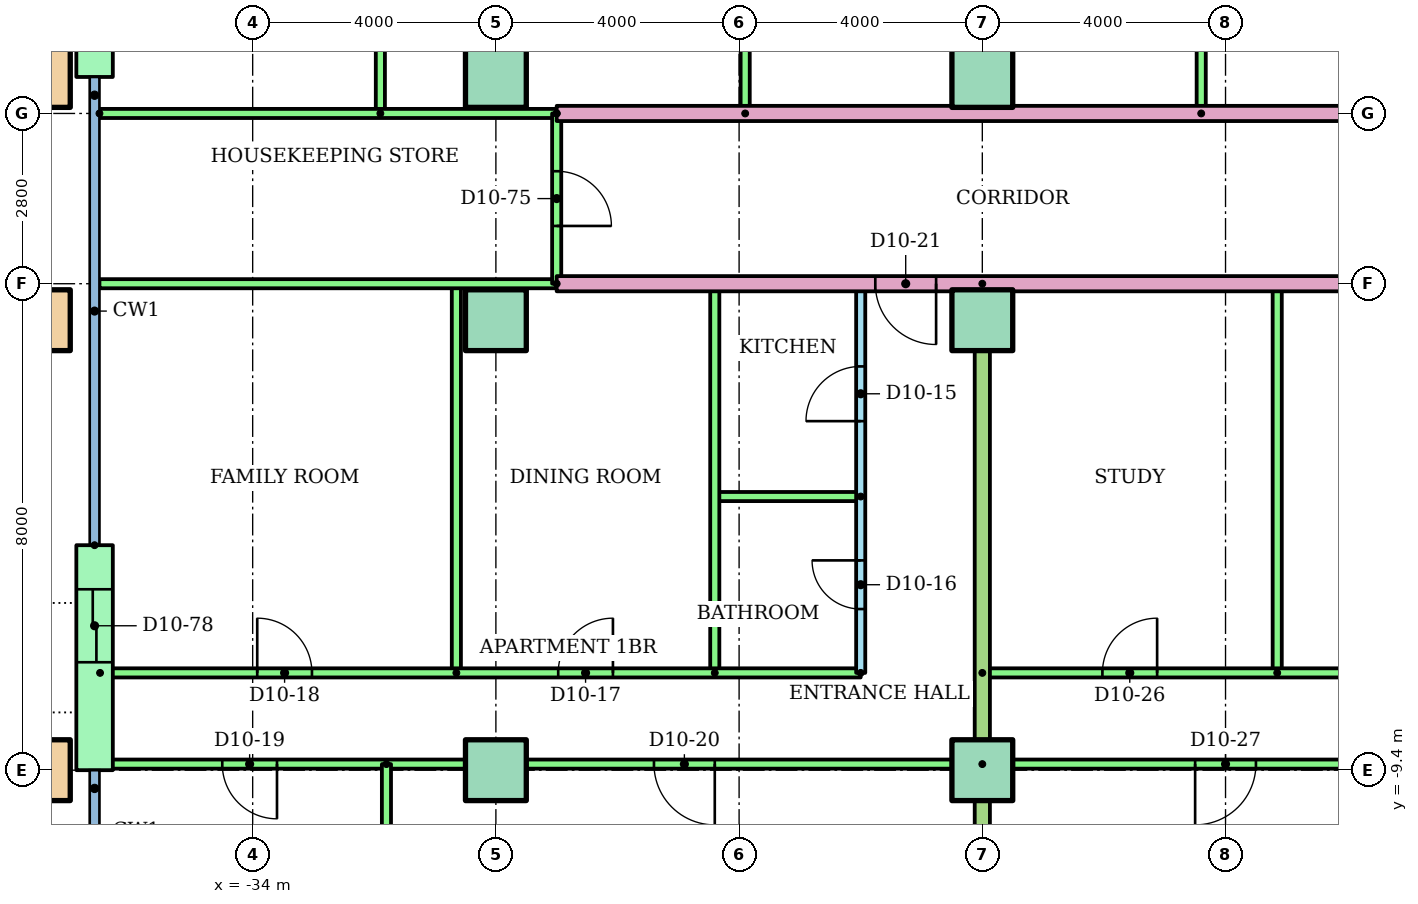
"""IFC4 building model, lengths in metres.
Left out: names, types, materials, properties, quantities, classifications, styles, units other than length and angle.
Written with IfcOpenShell. Run it as: python <this file> out.ifc"""

import sys

from ifc_helpers import new_model, si_unit, direction, frame, frame_2d, origin, origin_2d, place, context, subcontext, project, spatial, rectangle, hollow_rectangle, extrude, element, fill, save


model = new_model("IFC4")
c1 = context("Model", 3, precision=1e-05, world=origin(), true_north=direction((0.0, 1.0)))
c2 = subcontext(c1, "Body", "Model", "MODEL_VIEW")
j1 = project(units=[si_unit("LENGTHUNIT", "METRE"), si_unit("PLANEANGLEUNIT", "RADIAN")], contexts=[c1])
p1 = place(None, origin())
s1 = spatial("IfcSite", under=j1, at=p1, CompositionType="ELEMENT")
p2 = place(p1, origin())
s2 = spatial("IfcBuilding", under=s1, at=p2, CompositionType="ELEMENT")
p3 = place(p2, frame((0.0, 0.0, 41.6)))
s3 = spatial("IfcBuildingStorey", under=s2, at=p3, CompositionType="ELEMENT", Elevation=41.6)
p4 = place(p3, frame((-37.5, -9.4, 0.0)))
e1 = element("IfcColumn", 1, at=p4, inside=s3, PredefinedType="COLUMN", context=c2, shape_type="SweptSolid", body=[
    extrude(hollow_rectangle(XDim=1.0, YDim=1.0, WallThickness=0.05, at=origin_2d()), origin(), (0.0, 0.0, 1.0), 3.2),
])
for number, where in (
    (2, (-30.0, -9.4, 0.0)),
    (3, (-22.0, -9.4, 0.0)),
):
    element("IfcColumn", number, at=place(p3, frame(where)), inside=s3, PredefinedType="COLUMN", context=c2, shape_type="SweptSolid", body=[
        extrude(rectangle(XDim=1.0, YDim=1.0, at=origin_2d()), origin(), (0.0, 0.0, 1.0), 3.2),
    ])
p5 = place(p3, frame((-37.5, -2.0, 0.0)))
e4 = element("IfcColumn", 4, at=p5, inside=s3, PredefinedType="COLUMN", context=c2, shape_type="SweptSolid", body=[
    extrude(hollow_rectangle(XDim=1.0, YDim=1.0, WallThickness=0.05, at=origin_2d()), origin(), (0.0, 0.0, 1.0), 3.2),
])
for number, where in (
    (5, (-30.0, -2.0, 0.0)),
    (6, (-22.0, -2.0, 0.0)),
):
    element("IfcColumn", number, at=place(p3, frame(where)), inside=s3, PredefinedType="COLUMN", context=c2, shape_type="SweptSolid", body=[
        extrude(rectangle(XDim=1.0, YDim=1.0, at=origin_2d()), origin(), (0.0, 0.0, 1.0), 3.2),
    ])
p6 = place(p3, frame((-37.5, 2.0, 0.0)))
e7 = element("IfcColumn", 7, at=p6, inside=s3, PredefinedType="COLUMN", context=c2, shape_type="SweptSolid", body=[
    extrude(hollow_rectangle(XDim=1.0, YDim=1.0, WallThickness=0.05, at=origin_2d()), origin(), (0.0, 0.0, 1.0), 3.2),
])
for number, where in (
    (8, (-30.0, 2.0, 0.0)),
    (9, (-22.0, 2.0, 0.0)),
):
    element("IfcColumn", number, at=place(p3, frame(where)), inside=s3, PredefinedType="COLUMN", context=c2, shape_type="SweptSolid", body=[
        extrude(rectangle(XDim=1.0, YDim=1.0, at=origin_2d()), origin(), (0.0, 0.0, 1.0), 3.2),
    ])
p7 = place(p3, frame((-36.6, 6.5, 0.0), z_axis=(0.0, 0.0, 1.0), x_axis=(0.0, -1.0, 0.0)))
e10 = element("IfcWall", 10, at=p7, inside=s3, PredefinedType="STANDARD", context=c2, shape_type="SweptSolid", body=[
    extrude(rectangle(XDim=4.5, YDim=0.6, at=frame_2d((2.25, 0.0))), origin(), (0.0, 0.0, 1.0), 2.92),
])
p8 = place(p7, frame((1.65, 0.0, 0.0)))
e11 = element("IfcOpeningElement", 11, at=p8, cuts=e10, PredefinedType="OPENING", context=c2, shape_type="SweptSolid", body=[
    extrude(rectangle(XDim=1.2, YDim=2.1, at=frame_2d((0.6, 1.05))), frame((0.0, 0.31, 0.0), z_axis=(0.0, -1.0, 0.0), x_axis=(1.0, 0.0, 0.0)), (0.0, 0.0, 1.0), 0.62),
])
p9 = place(p3, frame((-36.6, -5.7, 0.0), z_axis=(0.0, 0.0, 1.0), x_axis=(0.0, -1.0, 0.0)))
e12 = element("IfcWall", 12, at=p9, inside=s3, PredefinedType="STANDARD", context=c2, shape_type="SweptSolid", body=[
    extrude(rectangle(XDim=3.7, YDim=0.6, at=frame_2d((1.85, 0.0))), origin(), (0.0, 0.0, 1.0), 2.92),
])
p10 = place(p9, frame((0.725, 0.0, 0.0)))
e13 = element("IfcOpeningElement", 13, at=p10, cuts=e12, PredefinedType="OPENING", context=c2, shape_type="SweptSolid", body=[
    extrude(rectangle(XDim=1.2, YDim=2.1, at=frame_2d((0.6, 1.05))), frame((0.0, 0.31, 0.0), z_axis=(0.0, -1.0, 0.0), x_axis=(1.0, 0.0, 0.0)), (0.0, 0.0, 1.0), 0.62),
])
p11 = place(p3, frame((-24.0, -7.8, 0.0), z_axis=(0.0, 0.0, 1.0), x_axis=(0.0, 1.0, 0.0)))
e14 = element("IfcWall", 14, at=p11, inside=s3, PredefinedType="PARTITIONING", context=c2, shape_type="SweptSolid", body=[
    extrude(rectangle(XDim=6.4, YDim=0.15, at=frame_2d((3.2, 0.0))), origin(), (0.0, 0.0, 1.0), 2.4),
])
p12 = place(p11, frame((4.14, 0.0, 0.0)))
e15 = element("IfcOpeningElement", 15, at=p12, cuts=e14, PredefinedType="OPENING", context=c2, shape_type="SweptSolid", body=[
    extrude(rectangle(XDim=0.9, YDim=2.1, at=frame_2d((0.45, 1.05))), frame((0.0, 0.085, 0.0), z_axis=(0.0, -1.0, 0.0), x_axis=(1.0, 0.0, 0.0)), (0.0, 0.0, 1.0), 0.17),
])
p13 = place(p11, frame((1.05, 0.0, 0.0)))
e16 = element("IfcOpeningElement", 16, at=p13, cuts=e14, PredefinedType="OPENING", context=c2, shape_type="SweptSolid", body=[
    extrude(rectangle(XDim=0.8, YDim=2.1, at=frame_2d((0.4, 1.05))), frame((0.0, 0.085, 0.0), z_axis=(0.0, -1.0, 0.0), x_axis=(1.0, 0.0, 0.0)), (0.0, 0.0, 1.0), 0.17),
])
p14 = place(p3, frame((-24.0, -4.9, 0.0), z_axis=(0.0, 0.0, 1.0), x_axis=(-1.0, 0.0, 0.0)))
e17 = element("IfcWall", 17, at=p14, inside=s3, PredefinedType="PARTITIONING", context=c2, shape_type="SweptSolid", body=[
    extrude(rectangle(XDim=2.4, YDim=0.15, at=frame_2d((1.2, 0.0))), origin(), (0.0, 0.0, 1.0), 2.4),
])
for number, where, z_axis, x_axis in (
    (18, (-26.4, -7.8, 0.0), (0.0, 0.0, 1.0), (0.0, 1.0, 0.0)),
    (19, (-30.65, -7.8, 0.0), (0.0, 0.0, 1.0), (0.0, 1.0, 0.0)),
):
    element("IfcWall", number, at=place(p3, frame(where, z_axis=z_axis, x_axis=x_axis)), inside=s3, PredefinedType="PARTITIONING", context=c2, shape_type="SweptSolid", body=[
        extrude(rectangle(XDim=6.4, YDim=0.15, at=frame_2d((3.2, 0.0))), origin(), (0.0, 0.0, 1.0), 2.4),
    ])
p15 = place(p3, frame((-36.51, -7.8, 0.0)))
e20 = element("IfcWall", 20, at=p15, inside=s3, PredefinedType="PARTITIONING", context=c2, shape_type="SweptSolid", body=[
    extrude(rectangle(XDim=12.51, YDim=0.15, at=frame_2d((6.255, 0.0))), origin(), (0.0, 0.0, 1.0), 2.4),
])
p16 = place(p15, frame((7.535, 0.0, 0.0)))
e21 = element("IfcOpeningElement", 21, at=p16, cuts=e20, PredefinedType="OPENING", context=c2, shape_type="SweptSolid", body=[
    extrude(rectangle(XDim=0.9, YDim=2.1, at=frame_2d((0.45, 1.05))), frame((0.0, 0.085, 0.0), z_axis=(0.0, -1.0, 0.0), x_axis=(1.0, 0.0, 0.0)), (0.0, 0.0, 1.0), 0.17),
])
p17 = place(p15, frame((2.585, 0.0, 0.0)))
e22 = element("IfcOpeningElement", 22, at=p17, cuts=e20, PredefinedType="OPENING", context=c2, shape_type="SweptSolid", body=[
    extrude(rectangle(XDim=0.9, YDim=2.1, at=frame_2d((0.45, 1.05))), frame((0.0, 0.085, 0.0), z_axis=(0.0, -1.0, 0.0), x_axis=(1.0, 0.0, 0.0)), (0.0, 0.0, 1.0), 0.17),
])
p18 = place(p3, frame((-22.0, -9.3, 0.0), z_axis=(0.0, 0.0, 1.0), x_axis=(-1.0, 0.0, 0.0)))
e23 = element("IfcWall", 23, at=p18, inside=s3, PredefinedType="PARTITIONING", context=c2, shape_type="SweptSolid", body=[
    extrude(rectangle(XDim=14.51, YDim=0.15, at=frame_2d((7.255, 0.0))), origin(), (0.0, 0.0, 1.0), 2.4),
])
p19 = place(p18, frame((11.6, 0.0, 0.0)))
e24 = element("IfcOpeningElement", 24, at=p19, cuts=e23, PredefinedType="OPENING", context=c2, shape_type="SweptSolid", body=[
    extrude(rectangle(XDim=0.9, YDim=2.1, at=frame_2d((0.45, 1.05))), frame((0.0, 0.085, 0.0), z_axis=(0.0, -1.0, 0.0), x_axis=(1.0, 0.0, 0.0)), (0.0, 0.0, 1.0), 0.17),
])
p20 = place(p18, frame((4.4, 0.0, 0.0)))
e25 = element("IfcOpeningElement", 25, at=p20, cuts=e23, PredefinedType="OPENING", context=c2, shape_type="SweptSolid", body=[
    extrude(rectangle(XDim=1.0, YDim=2.1, at=frame_2d((0.5, 1.05))), frame((0.0, 0.085, 0.0), z_axis=(0.0, -1.0, 0.0), x_axis=(1.0, 0.0, 0.0)), (0.0, 0.0, 1.0), 0.17),
])
p21 = place(p3, frame((-31.8, -9.3, 0.0), z_axis=(0.0, 0.0, 1.0), x_axis=(0.0, -1.0, 0.0)))
e26 = element("IfcWall", 26, at=p21, inside=s3, PredefinedType="PARTITIONING", context=c2, shape_type="SweptSolid", body=[
    extrude(rectangle(XDim=5.02, YDim=0.15, at=frame_2d((2.51, 0.0))), origin(), (0.0, 0.0, 1.0), 2.4),
])
p22 = place(p3, frame((-17.15, -7.8, 0.0), z_axis=(0.0, 0.0, 1.0), x_axis=(0.0, 1.0, 0.0)))
e27 = element("IfcWall", 27, at=p22, inside=s3, PredefinedType="PARTITIONING", context=c2, shape_type="SweptSolid", body=[
    extrude(rectangle(XDim=6.4, YDim=0.15, at=frame_2d((3.2, 0.0))), origin(), (0.0, 0.0, 1.0), 2.4),
])
p23 = place(p3, frame((-22.0, -7.8, 0.0)))
e28 = element("IfcWall", 28, at=p23, inside=s3, PredefinedType="PARTITIONING", context=c2, shape_type="SweptSolid", body=[
    extrude(rectangle(XDim=22.0, YDim=0.15, at=frame_2d((11.0, 0.0))), origin(), (0.0, 0.0, 1.0), 2.4),
])
p24 = place(p23, frame((14.34, 0.0, 0.0)))
e29 = element("IfcOpeningElement", 29, at=p24, cuts=e28, PredefinedType="OPENING", context=c2, shape_type="SweptSolid", body=[
    extrude(rectangle(XDim=0.9, YDim=2.1, at=frame_2d((0.45, 1.05))), frame((0.0, 0.085, 0.0), z_axis=(0.0, -1.0, 0.0), x_axis=(1.0, 0.0, 0.0)), (0.0, 0.0, 1.0), 0.17),
])
p25 = place(p23, frame((8.76, 0.0, 0.0)))
e30 = element("IfcOpeningElement", 30, at=p25, cuts=e28, PredefinedType="OPENING", context=c2, shape_type="SweptSolid", body=[
    extrude(rectangle(XDim=0.9, YDim=2.1, at=frame_2d((0.45, 1.05))), frame((0.0, 0.085, 0.0), z_axis=(0.0, -1.0, 0.0), x_axis=(1.0, 0.0, 0.0)), (0.0, 0.0, 1.0), 0.17),
])
p26 = place(p23, frame((1.975, 0.0, 0.0)))
e31 = element("IfcOpeningElement", 31, at=p26, cuts=e28, PredefinedType="OPENING", context=c2, shape_type="SweptSolid", body=[
    extrude(rectangle(XDim=0.9, YDim=2.1, at=frame_2d((0.45, 1.05))), frame((0.0, 0.085, 0.0), z_axis=(0.0, -1.0, 0.0), x_axis=(1.0, 0.0, 0.0)), (0.0, 0.0, 1.0), 0.17),
])
p27 = place(p3, frame((2.0, -9.3, 0.0), z_axis=(0.0, 0.0, 1.0), x_axis=(-1.0, 0.0, 0.0)))
e32 = element("IfcWall", 32, at=p27, inside=s3, PredefinedType="PARTITIONING", context=c2, shape_type="SweptSolid", body=[
    extrude(rectangle(XDim=24.0, YDim=0.15, at=frame_2d((12.0, 0.0))), origin(), (0.0, 0.0, 1.0), 2.4),
])
p28 = place(p27, frame((19.5, 0.0, 0.0)))
e33 = element("IfcOpeningElement", 33, at=p28, cuts=e32, PredefinedType="OPENING", context=c2, shape_type="SweptSolid", body=[
    extrude(rectangle(XDim=1.0, YDim=2.1, at=frame_2d((0.5, 1.05))), frame((0.0, 0.085, 0.0), z_axis=(0.0, -1.0, 0.0), x_axis=(1.0, 0.0, 0.0)), (0.0, 0.0, 1.0), 0.17),
])
p29 = place(p27, frame((13.55, 0.0, 0.0)))
e34 = element("IfcOpeningElement", 34, at=p29, cuts=e32, PredefinedType="OPENING", context=c2, shape_type="SweptSolid", body=[
    extrude(rectangle(XDim=0.9, YDim=2.1, at=frame_2d((0.45, 1.05))), frame((0.0, 0.085, 0.0), z_axis=(0.0, -1.0, 0.0), x_axis=(1.0, 0.0, 0.0)), (0.0, 0.0, 1.0), 0.17),
])
p30 = place(p27, frame((9.55, 0.0, 0.0)))
e35 = element("IfcOpeningElement", 35, at=p30, cuts=e32, PredefinedType="OPENING", context=c2, shape_type="SweptSolid", body=[
    extrude(rectangle(XDim=0.9, YDim=2.1, at=frame_2d((0.45, 1.05))), frame((0.0, 0.085, 0.0), z_axis=(0.0, -1.0, 0.0), x_axis=(1.0, 0.0, 0.0)), (0.0, 0.0, 1.0), 0.17),
])
p31 = place(p27, frame((5.55, 0.0, 0.0)))
e36 = element("IfcOpeningElement", 36, at=p31, cuts=e32, PredefinedType="OPENING", context=c2, shape_type="SweptSolid", body=[
    extrude(rectangle(XDim=0.9, YDim=2.1, at=frame_2d((0.45, 1.05))), frame((0.0, 0.085, 0.0), z_axis=(0.0, -1.0, 0.0), x_axis=(1.0, 0.0, 0.0)), (0.0, 0.0, 1.0), 0.17),
])
p32 = place(p27, frame((1.55, 0.0, 0.0)))
e37 = element("IfcOpeningElement", 37, at=p32, cuts=e32, PredefinedType="OPENING", context=c2, shape_type="SweptSolid", body=[
    extrude(rectangle(XDim=0.9, YDim=2.1, at=frame_2d((0.45, 1.05))), frame((0.0, 0.085, 0.0), z_axis=(0.0, -1.0, 0.0), x_axis=(1.0, 0.0, 0.0)), (0.0, 0.0, 1.0), 0.17),
])
p33 = place(p3, frame((-22.0, -1.4, 0.0), z_axis=(0.0, 0.0, 1.0), x_axis=(0.0, -1.0, 0.0)))
e38 = element("IfcWall", 38, at=p33, inside=s3, PredefinedType="PARTITIONING", context=c2, shape_type="SweptSolid", body=[
    extrude(rectangle(XDim=14.71, YDim=0.25, at=frame_2d((7.355, 0.0))), origin(), (0.0, 0.0, 1.0), 2.4),
])
p34 = place(p3, frame((-14.0, -1.4, 0.0), z_axis=(0.0, 0.0, 1.0), x_axis=(-1.0, 0.0, 0.0)))
e39 = element("IfcWall", 39, at=p34, inside=s3, PredefinedType="PARTITIONING", context=c2, shape_type="SweptSolid", body=[
    extrude(rectangle(XDim=15.0, YDim=0.25, at=frame_2d((7.5, 0.0))), origin(), (0.0, 0.0, 1.0), 2.4),
])
p35 = place(p34, frame((8.76, 0.0, 0.0)))
e40 = element("IfcOpeningElement", 40, at=p35, cuts=e39, PredefinedType="OPENING", context=c2, shape_type="SweptSolid", body=[
    extrude(rectangle(XDim=1.0, YDim=2.1, at=frame_2d((0.5, 1.05))), frame((0.0, 0.135, 0.0), z_axis=(0.0, -1.0, 0.0), x_axis=(1.0, 0.0, 0.0)), (0.0, 0.0, 1.0), 0.27),
])
p36 = place(p3, frame((-29.0, -1.4, 0.0), z_axis=(0.0, 0.0, 1.0), x_axis=(-1.0, 0.0, 0.0)))
e41 = element("IfcWall", 41, at=p36, inside=s3, PredefinedType="PARTITIONING", context=c2, shape_type="SweptSolid", body=[
    extrude(rectangle(XDim=7.52, YDim=0.15, at=frame_2d((3.76, 0.0))), origin(), (0.0, 0.0, 1.0), 2.4),
])
for number, where, z_axis, x_axis in (
    (42, (-18.4, 1.4, 0.0), (0.0, 0.0, 1.0), (0.0, 1.0, 0.0)),
    (43, (-25.9, 1.4, 0.0), (0.0, 0.0, 1.0), (0.0, 1.0, 0.0)),
    (44, (-31.9, 1.4, 0.0), (0.0, 0.0, 1.0), (0.0, 1.0, 0.0)),
):
    element("IfcWall", number, at=place(p3, frame(where, z_axis=z_axis, x_axis=x_axis)), inside=s3, PredefinedType="PARTITIONING", context=c2, shape_type="SweptSolid", body=[
        extrude(rectangle(XDim=8.8, YDim=0.15, at=frame_2d((4.4, 0.0))), origin(), (0.0, 0.0, 1.0), 2.4),
    ])
p37 = place(p3, frame((-29.0, 1.4, 0.0)))
e45 = element("IfcWall", 45, at=p37, inside=s3, PredefinedType="PARTITIONING", context=c2, shape_type="SweptSolid", body=[
    extrude(rectangle(XDim=15.0, YDim=0.25, at=frame_2d((7.5, 0.0))), origin(), (0.0, 0.0, 1.0), 2.4),
])
p38 = place(p37, frame((13.5, 0.0, 0.0)))
e46 = element("IfcOpeningElement", 46, at=p38, cuts=e45, PredefinedType="OPENING", context=c2, shape_type="SweptSolid", body=[
    extrude(rectangle(XDim=1.0, YDim=2.1, at=frame_2d((0.5, 1.05))), frame((0.0, 0.135, 0.0), z_axis=(0.0, -1.0, 0.0), x_axis=(1.0, 0.0, 0.0)), (0.0, 0.0, 1.0), 0.27),
])
p39 = place(p3, frame((-36.52, 1.4, 0.0)))
e47 = element("IfcWall", 47, at=p39, inside=s3, PredefinedType="PARTITIONING", context=c2, shape_type="SweptSolid", body=[
    extrude(rectangle(XDim=7.52, YDim=0.15, at=frame_2d((3.76, 0.0))), origin(), (0.0, 0.0, 1.0), 2.4),
])
p40 = place(p3, frame((-29.0, 1.4, 0.0), z_axis=(0.0, 0.0, 1.0), x_axis=(0.0, -1.0, 0.0)))
e48 = element("IfcWall", 48, at=p40, inside=s3, PredefinedType="PARTITIONING", context=c2, shape_type="SweptSolid", body=[
    extrude(rectangle(XDim=2.8, YDim=0.15, at=frame_2d((1.4, 0.0))), origin(), (0.0, 0.0, 1.0), 2.4),
])
p41 = place(p40, frame((0.95, 0.0, 0.0)))
e49 = element("IfcOpeningElement", 49, at=p41, cuts=e48, PredefinedType="OPENING", context=c2, shape_type="SweptSolid", body=[
    extrude(rectangle(XDim=0.9, YDim=2.1, at=frame_2d((0.45, 1.05))), frame((0.0, 0.085, 0.0), z_axis=(0.0, -1.0, 0.0), x_axis=(1.0, 0.0, 0.0)), (0.0, 0.0, 1.0), 0.17),
])
p42 = place(p12, origin())
e50 = element("IfcDoor", 50, at=p42, inside=s3, OperationType="SINGLE_SWING_LEFT", PredefinedType="DOOR", context=c2, shape_type="SweptSolid", body=[
    extrude(rectangle(XDim=0.9, YDim=2.1, at=frame_2d((0.45, 1.05))), frame((0.0, 0.025, 0.0), z_axis=(0.0, -1.0, 0.0), x_axis=(1.0, 0.0, 0.0)), (0.0, 0.0, 1.0), 0.05),
])
fill(e15, e50)
p43 = place(p13, origin())
e51 = element("IfcDoor", 51, at=p43, inside=s3, OperationType="SINGLE_SWING_RIGHT", PredefinedType="DOOR", context=c2, shape_type="SweptSolid", body=[
    extrude(rectangle(XDim=0.8, YDim=2.1, at=frame_2d((0.4, 1.05))), frame((0.0, 0.025, 0.0), z_axis=(0.0, -1.0, 0.0), x_axis=(1.0, 0.0, 0.0)), (0.0, 0.0, 1.0), 0.05),
])
fill(e16, e51)
p44 = place(p16, origin())
e52 = element("IfcDoor", 52, at=p44, inside=s3, OperationType="SINGLE_SWING_RIGHT", PredefinedType="DOOR", context=c2, shape_type="SweptSolid", body=[
    extrude(rectangle(XDim=0.9, YDim=2.1, at=frame_2d((0.45, 1.05))), frame((0.0, 0.025, 0.0), z_axis=(0.0, -1.0, 0.0), x_axis=(1.0, 0.0, 0.0)), (0.0, 0.0, 1.0), 0.05),
])
fill(e21, e52)
p45 = place(p17, origin())
e53 = element("IfcDoor", 53, at=p45, inside=s3, OperationType="SINGLE_SWING_LEFT", PredefinedType="DOOR", context=c2, shape_type="SweptSolid", body=[
    extrude(rectangle(XDim=0.9, YDim=2.1, at=frame_2d((0.45, 1.05))), frame((0.0, 0.025, 0.0), z_axis=(0.0, -1.0, 0.0), x_axis=(1.0, 0.0, 0.0)), (0.0, 0.0, 1.0), 0.05),
])
fill(e22, e53)
p46 = place(p19, origin())
e54 = element("IfcDoor", 54, at=p46, inside=s3, OperationType="SINGLE_SWING_LEFT", PredefinedType="DOOR", context=c2, shape_type="SweptSolid", body=[
    extrude(rectangle(XDim=0.9, YDim=2.1, at=frame_2d((0.45, 1.05))), frame((0.0, 0.025, 0.0), z_axis=(0.0, -1.0, 0.0), x_axis=(1.0, 0.0, 0.0)), (0.0, 0.0, 1.0), 0.05),
])
fill(e24, e54)
p47 = place(p20, origin())
e55 = element("IfcDoor", 55, at=p47, inside=s3, OperationType="SINGLE_SWING_LEFT", PredefinedType="DOOR", context=c2, shape_type="SweptSolid", body=[
    extrude(rectangle(XDim=1.0, YDim=2.1, at=frame_2d((0.5, 1.05))), frame((0.0, 0.025, 0.0), z_axis=(0.0, -1.0, 0.0), x_axis=(1.0, 0.0, 0.0)), (0.0, 0.0, 1.0), 0.05),
])
fill(e25, e55)
p48 = place(p35, origin())
e56 = element("IfcDoor", 56, at=p48, inside=s3, OperationType="SINGLE_SWING_LEFT", PredefinedType="DOOR", context=c2, shape_type="SweptSolid", body=[
    extrude(rectangle(XDim=1.0, YDim=2.1, at=frame_2d((0.5, 1.05))), frame((0.0, 0.025, 0.0), z_axis=(0.0, -1.0, 0.0), x_axis=(1.0, 0.0, 0.0)), (0.0, 0.0, 1.0), 0.05),
])
fill(e40, e56)
p49 = place(p26, origin())
e57 = element("IfcDoor", 57, at=p49, inside=s3, OperationType="SINGLE_SWING_RIGHT", PredefinedType="DOOR", context=c2, shape_type="SweptSolid", body=[
    extrude(rectangle(XDim=0.9, YDim=2.1, at=frame_2d((0.45, 1.05))), frame((0.0, 0.025, 0.0), z_axis=(0.0, -1.0, 0.0), x_axis=(1.0, 0.0, 0.0)), (0.0, 0.0, 1.0), 0.05),
])
fill(e31, e57)
p50 = place(p28, origin())
e58 = element("IfcDoor", 58, at=p50, inside=s3, OperationType="SINGLE_SWING_RIGHT", PredefinedType="DOOR", context=c2, shape_type="SweptSolid", body=[
    extrude(rectangle(XDim=1.0, YDim=2.1, at=frame_2d((0.5, 1.05))), frame((0.0, 0.025, 0.0), z_axis=(0.0, -1.0, 0.0), x_axis=(1.0, 0.0, 0.0)), (0.0, 0.0, 1.0), 0.05),
])
fill(e33, e58)
p51 = place(p41, origin())
e59 = element("IfcDoor", 59, at=p51, inside=s3, OperationType="SINGLE_SWING_RIGHT", PredefinedType="DOOR", context=c2, shape_type="SweptSolid", body=[
    extrude(rectangle(XDim=0.9, YDim=2.1, at=frame_2d((0.45, 1.05))), frame((0.0, 0.025, 0.0), z_axis=(0.0, -1.0, 0.0), x_axis=(1.0, 0.0, 0.0)), (0.0, 0.0, 1.0), 0.05),
])
fill(e49, e59)
p52 = place(p10, origin())
e60 = element("IfcDoor", 60, at=p52, inside=s3, OperationType="SLIDING_TO_LEFT", PredefinedType="DOOR", context=c2, shape_type="SweptSolid", body=[
    extrude(rectangle(XDim=1.2, YDim=2.1, at=frame_2d((0.6, 1.05))), frame((0.0, 0.025, 0.0), z_axis=(0.0, -1.0, 0.0), x_axis=(1.0, 0.0, 0.0)), (0.0, 0.0, 1.0), 0.05),
])
fill(e13, e60)
save(model, sys.argv[1])
